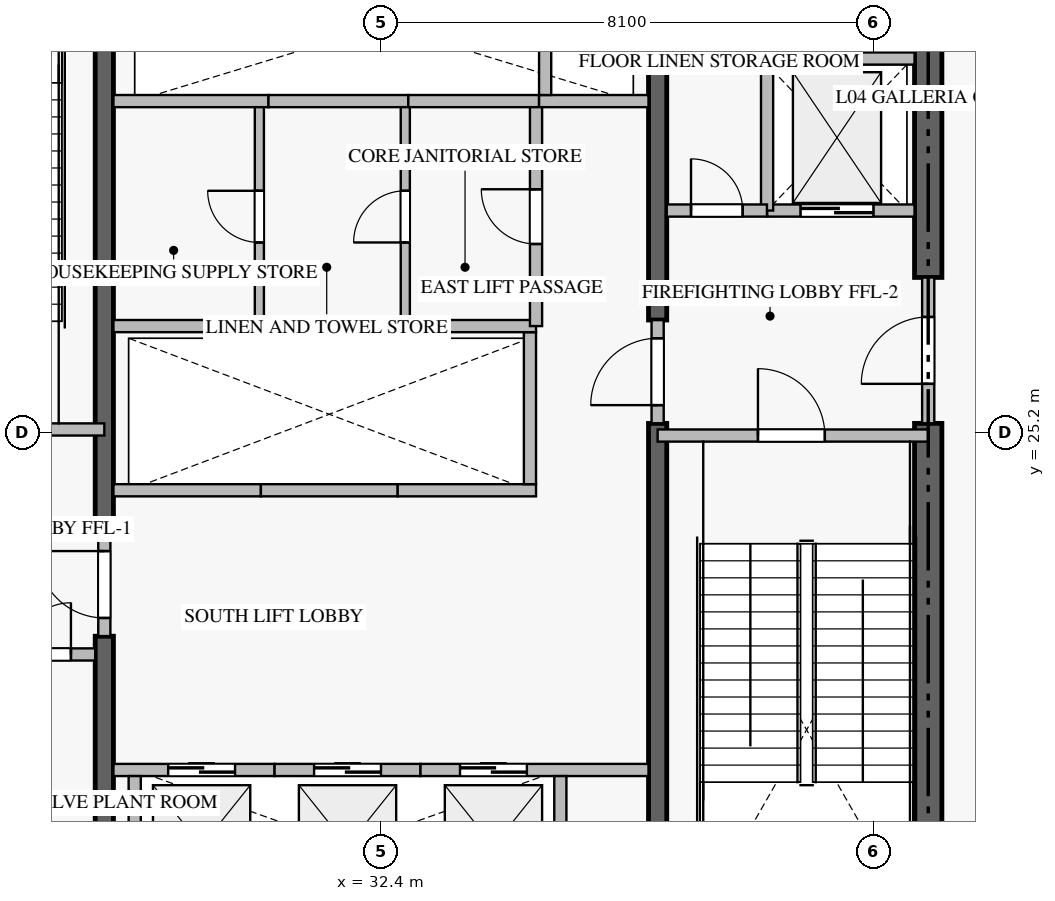
"""IFC4 building model, lengths in metres.
Left out: names, types, materials, properties, quantities, classifications, styles, units other than length and angle.
Written with IfcOpenShell. Run it as: python <this file> out.ifc"""

import sys

from ifc_helpers import new_model, si_unit, direction, frame, frame_2d, origin, place, context, subcontext, project, spatial, rectangle, extrude, source, transform, mapped, element, fill, save


model = new_model("IFC4")
c1 = context("Model", 3, precision=1e-05, world=origin(), true_north=direction((0.0, 1.0)))
c2 = subcontext(c1, "Body", "Model", "MODEL_VIEW")
j1 = project(units=[si_unit("LENGTHUNIT", "METRE"), si_unit("PLANEANGLEUNIT", "RADIAN")], contexts=[c1])
p1 = place(None, origin())
s1 = spatial("IfcSite", under=j1, at=p1, CompositionType="ELEMENT")
p2 = place(p1, origin())
s2 = spatial("IfcBuilding", under=s1, at=p2, CompositionType="ELEMENT")
p3 = place(p2, frame((0.0, 0.0, 21.0)))
s3 = spatial("IfcBuildingStorey", under=s2, at=p3, CompositionType="ELEMENT", Elevation=21.0)
p4 = place(p3, frame((41.4, 17.025, -0.85), z_axis=(0.0, 0.0, 1.0), x_axis=(0.0, 1.0, 0.0)))
e1 = element("IfcWall", 1, at=p4, inside=s3, PredefinedType="SHEAR", context=c2, shape_type="SweptSolid", body=[
    extrude(rectangle(XDim=8.325, YDim=0.45, at=frame_2d((4.163, 0.0))), origin(), (0.0, 0.0, 1.0), 6.108),
])
p5 = place(p3, frame((41.4, 27.75, -0.85), z_axis=(0.0, 0.0, 1.0), x_axis=(0.0, 1.0, 0.0)))
e2 = element("IfcWall", 2, at=p5, inside=s3, PredefinedType="SHEAR", context=c2, shape_type="SweptSolid", body=[
    extrude(rectangle(XDim=5.625, YDim=0.45, at=frame_2d((2.812, 0.0))), origin(), (0.0, 0.0, 1.0), 6.108),
])
p6 = place(p3, frame((27.85, 17.025, -0.85), z_axis=(0.0, 0.0, 1.0), x_axis=(0.0, 1.0, 0.0)))
e3 = element("IfcWall", 3, at=p6, inside=s3, PredefinedType="SHEAR", context=c2, shape_type="SweptSolid", body=[
    extrude(rectangle(XDim=4.825, YDim=0.3, at=frame_2d((2.413, 0.0))), origin(), (0.0, 0.0, 1.0), 6.108),
])
p7 = place(p3, frame((27.85, 23.55, -0.85), z_axis=(0.0, 0.0, 1.0), x_axis=(0.0, 1.0, 0.0)))
e4 = element("IfcWall", 4, at=p7, inside=s3, PredefinedType="SHEAR", context=c2, shape_type="SweptSolid", body=[
    extrude(rectangle(XDim=9.825, YDim=0.3, at=frame_2d((4.913, 0.0))), origin(), (0.0, 0.0, 1.0), 6.108),
])
p8 = place(p3, frame((36.95, 17.025, -0.85), z_axis=(0.0, 0.0, 1.0), x_axis=(0.0, 1.0, 0.0)))
e5 = element("IfcWall", 5, at=p8, inside=s3, PredefinedType="SHEAR", context=c2, shape_type="SweptSolid", body=[
    extrude(rectangle(XDim=8.325, YDim=0.3, at=frame_2d((4.163, 0.0))), origin(), (0.0, 0.0, 1.0), 6.108),
])
p9 = place(p3, frame((36.95, 27.05, -0.85), z_axis=(0.0, 0.0, 1.0), x_axis=(0.0, 1.0, 0.0)))
e6 = element("IfcWall", 6, at=p9, inside=s3, PredefinedType="SHEAR", context=c2, shape_type="SweptSolid", body=[
    extrude(rectangle(XDim=6.325, YDim=0.3, at=frame_2d((3.163, 0.0))), origin(), (0.0, 0.0, 1.0), 6.108),
])
p10 = place(p3, frame((23.4, 25.25, 0.0), z_axis=(0.0, 0.0, 1.0), x_axis=(1.0, 0.0, 0.0)))
e7 = element("IfcWall", 7, at=p10, inside=s3, PredefinedType="STANDARD", context=c2, shape_type="SweptSolid", body=[
    extrude(rectangle(XDim=4.45, YDim=0.2, at=frame_2d((2.225, 0.0))), origin(), (0.0, 0.0, 1.0), 5.26),
])
p11 = place(p10, frame((1.65, 0.0, 0.0)))
e8 = element("IfcOpeningElement", 8, at=p11, cuts=e7, PredefinedType="OPENING", context=c2, shape_type="SweptSolid", body=[
    extrude(rectangle(XDim=1.1, YDim=2.15, at=frame_2d((0.55, 1.075))), frame((0.0, 0.11, 0.0), z_axis=(0.0, -1.0, 0.0), x_axis=(1.0, 0.0, 0.0)), (0.0, 0.0, 1.0), 0.22),
])
p12 = place(p3, frame((36.95, 25.15, 0.0), z_axis=(0.0, 0.0, 1.0), x_axis=(1.0, 0.0, 0.0)))
e9 = element("IfcWall", 9, at=p12, inside=s3, PredefinedType="STANDARD", context=c2, shape_type="SweptSolid", body=[
    extrude(rectangle(XDim=4.45, YDim=0.2, at=frame_2d((2.225, 0.0))), origin(), (0.0, 0.0, 1.0), 5.26),
])
p13 = place(p12, frame((1.65, 0.0, 0.0)))
e10 = element("IfcOpeningElement", 10, at=p13, cuts=e9, PredefinedType="OPENING", context=c2, shape_type="SweptSolid", body=[
    extrude(rectangle(XDim=1.1, YDim=2.15, at=frame_2d((0.55, 1.075))), frame((0.0, 0.11, 0.0), z_axis=(0.0, -1.0, 0.0), x_axis=(1.0, 0.0, 0.0)), (0.0, 0.0, 1.0), 0.22),
])
p14 = place(p3, frame((38.75, 28.85, 0.0), z_axis=(0.0, 0.0, 1.0), x_axis=(1.0, 0.0, 0.0)))
e11 = element("IfcWall", 11, at=p14, inside=s3, PredefinedType="STANDARD", context=c2, shape_type="SweptSolid", body=[
    extrude(rectangle(XDim=2.425, YDim=0.2, at=frame_2d((1.212, 0.0))), origin(), (0.0, 0.0, 1.0), 5.26),
])
p15 = place(p14, frame((0.55, 0.0, 0.0)))
e12 = element("IfcOpeningElement", 12, at=p15, cuts=e11, PredefinedType="OPENING", context=c2, shape_type="SweptSolid", body=[
    extrude(rectangle(XDim=1.2, YDim=2.2, at=frame_2d((0.6, 1.1))), frame((0.0, 0.11, 0.0), z_axis=(0.0, -1.0, 0.0), x_axis=(1.0, 0.0, 0.0)), (0.0, 0.0, 1.0), 0.22),
])
p16 = place(p3, frame((28.0, 19.65, 0.0), z_axis=(0.0, 0.0, 1.0), x_axis=(1.0, 0.0, 0.0)))
e13 = element("IfcWall", 13, at=p16, inside=s3, PredefinedType="STANDARD", context=c2, shape_type="SweptSolid", body=[
    extrude(rectangle(XDim=2.65, YDim=0.2, at=frame_2d((1.325, 0.0))), origin(), (0.0, 0.0, 1.0), 5.26),
])
p17 = place(p16, frame((0.9, 0.0, 0.0)))
e14 = element("IfcOpeningElement", 14, at=p17, cuts=e13, PredefinedType="OPENING", context=c2, shape_type="SweptSolid", body=[
    extrude(rectangle(XDim=1.1, YDim=2.2, at=frame_2d((0.55, 1.1))), frame((0.0, 0.11, 0.0), z_axis=(0.0, -1.0, 0.0), x_axis=(1.0, 0.0, 0.0)), (0.0, 0.0, 1.0), 0.22),
])
p18 = place(p3, frame((28.35, 17.025, 0.0), z_axis=(0.0, 0.0, 1.0), x_axis=(0.0, 1.0, 0.0)))
e15 = element("IfcWall", 15, at=p18, inside=s3, PredefinedType="STANDARD", context=c2, shape_type="SweptSolid", body=[
    extrude(rectangle(XDim=2.525, YDim=0.2, at=frame_2d((1.263, 0.0))), origin(), (0.0, 0.0, 1.0), 5.26),
])
p19 = place(p3, frame((30.65, 19.65, 0.0), z_axis=(0.0, 0.0, 1.0), x_axis=(1.0, 0.0, 0.0)))
e16 = element("IfcWall", 16, at=p19, inside=s3, PredefinedType="STANDARD", context=c2, shape_type="SweptSolid", body=[
    extrude(rectangle(XDim=2.4, YDim=0.2, at=frame_2d((1.2, 0.0))), origin(), (0.0, 0.0, 1.0), 5.26),
])
p20 = place(p19, frame((0.65, 0.0, 0.0)))
e17 = element("IfcOpeningElement", 17, at=p20, cuts=e16, PredefinedType="OPENING", context=c2, shape_type="SweptSolid", body=[
    extrude(rectangle(XDim=1.1, YDim=2.2, at=frame_2d((0.55, 1.1))), frame((0.0, 0.11, 0.0), z_axis=(0.0, -1.0, 0.0), x_axis=(1.0, 0.0, 0.0)), (0.0, 0.0, 1.0), 0.22),
])
p21 = place(p3, frame((33.05, 19.65, 0.0), z_axis=(0.0, 0.0, 1.0), x_axis=(1.0, 0.0, 0.0)))
e18 = element("IfcWall", 18, at=p21, inside=s3, PredefinedType="STANDARD", context=c2, shape_type="SweptSolid", body=[
    extrude(rectangle(XDim=3.75, YDim=0.2, at=frame_2d((1.875, 0.0))), origin(), (0.0, 0.0, 1.0), 5.26),
])
p22 = place(p21, frame((0.65, 0.0, 0.0)))
e19 = element("IfcOpeningElement", 19, at=p22, cuts=e18, PredefinedType="OPENING", context=c2, shape_type="SweptSolid", body=[
    extrude(rectangle(XDim=1.1, YDim=2.2, at=frame_2d((0.55, 1.1))), frame((0.0, 0.11, 0.0), z_axis=(0.0, -1.0, 0.0), x_axis=(1.0, 0.0, 0.0)), (0.0, 0.0, 1.0), 0.22),
])
p23 = place(p3, frame((35.35, 17.025, 0.0), z_axis=(0.0, 0.0, 1.0), x_axis=(0.0, 1.0, 0.0)))
e20 = element("IfcWall", 20, at=p23, inside=s3, PredefinedType="STANDARD", context=c2, shape_type="SweptSolid", body=[
    extrude(rectangle(XDim=2.525, YDim=0.2, at=frame_2d((1.263, 0.0))), origin(), (0.0, 0.0, 1.0), 5.26),
])
p24 = place(p3, frame((28.0, 24.25, 0.0), z_axis=(0.0, 0.0, 1.0), x_axis=(1.0, 0.0, 0.0)))
e21 = element("IfcWall", 21, at=p24, inside=s3, PredefinedType="STANDARD", context=c2, shape_type="SweptSolid", body=[
    extrude(rectangle(XDim=2.425, YDim=0.2, at=frame_2d((1.212, 0.0))), origin(), (0.0, 0.0, 1.0), 5.26),
])
p25 = place(p3, frame((30.425, 24.25, 0.0), z_axis=(0.0, 0.0, 1.0), x_axis=(1.0, 0.0, 0.0)))
e22 = element("IfcWall", 22, at=p25, inside=s3, PredefinedType="STANDARD", context=c2, shape_type="SweptSolid", body=[
    extrude(rectangle(XDim=2.25, YDim=0.2, at=frame_2d((1.125, 0.0))), origin(), (0.0, 0.0, 1.0), 5.26),
])
p26 = place(p3, frame((32.675, 24.25, 0.0), z_axis=(0.0, 0.0, 1.0), x_axis=(1.0, 0.0, 0.0)))
e23 = element("IfcWall", 23, at=p26, inside=s3, PredefinedType="STANDARD", context=c2, shape_type="SweptSolid", body=[
    extrude(rectangle(XDim=2.275, YDim=0.2, at=frame_2d((1.137, 0.0))), origin(), (0.0, 0.0, 1.0), 5.26),
])
p27 = place(p3, frame((34.85, 24.35, 0.0), z_axis=(0.0, 0.0, 1.0), x_axis=(0.0, 1.0, 0.0)))
e24 = element("IfcWall", 24, at=p27, inside=s3, PredefinedType="STANDARD", context=c2, shape_type="SweptSolid", body=[
    extrude(rectangle(XDim=2.5, YDim=0.2, at=frame_2d((1.25, 0.0))), origin(), (0.0, 0.0, 1.0), 5.26),
])
p28 = place(p3, frame((28.0, 30.65, 0.0), z_axis=(0.0, 0.0, 1.0), x_axis=(1.0, 0.0, 0.0)))
e25 = element("IfcWall", 25, at=p28, inside=s3, PredefinedType="STANDARD", context=c2, shape_type="SweptSolid", body=[
    extrude(rectangle(XDim=2.55, YDim=0.2, at=frame_2d((1.275, 0.0))), origin(), (0.0, 0.0, 1.0), 5.26),
])
p29 = place(p3, frame((30.55, 30.65, 0.0), z_axis=(0.0, 0.0, 1.0), x_axis=(1.0, 0.0, 0.0)))
e26 = element("IfcWall", 26, at=p29, inside=s3, PredefinedType="STANDARD", context=c2, shape_type="SweptSolid", body=[
    extrude(rectangle(XDim=2.3, YDim=0.2, at=frame_2d((1.15, 0.0))), origin(), (0.0, 0.0, 1.0), 5.26),
])
p30 = place(p3, frame((32.85, 30.65, 0.0), z_axis=(0.0, 0.0, 1.0), x_axis=(1.0, 0.0, 0.0)))
e27 = element("IfcWall", 27, at=p30, inside=s3, PredefinedType="STANDARD", context=c2, shape_type="SweptSolid", body=[
    extrude(rectangle(XDim=2.15, YDim=0.2, at=frame_2d((1.075, 0.0))), origin(), (0.0, 0.0, 1.0), 5.26),
])
p31 = place(p3, frame((35.0, 30.65, 0.0), z_axis=(0.0, 0.0, 1.0), x_axis=(1.0, 0.0, 0.0)))
e28 = element("IfcWall", 28, at=p31, inside=s3, PredefinedType="STANDARD", context=c2, shape_type="SweptSolid", body=[
    extrude(rectangle(XDim=1.8, YDim=0.2, at=frame_2d((0.9, 0.0))), origin(), (0.0, 0.0, 1.0), 5.26),
])
p32 = place(p3, frame((35.1, 30.75, 0.0), z_axis=(0.0, 0.0, 1.0), x_axis=(0.0, 1.0, 0.0)))
e29 = element("IfcWall", 29, at=p32, inside=s3, PredefinedType="STANDARD", context=c2, shape_type="SweptSolid", body=[
    extrude(rectangle(XDim=2.625, YDim=0.2, at=frame_2d((1.312, 0.0))), origin(), (0.0, 0.0, 1.0), 5.26),
])
p33 = place(p3, frame((26.052, 21.55, 0.0), z_axis=(0.0, 0.0, 1.0), x_axis=(1.0, 0.0, 0.0)))
e30 = element("IfcWall", 30, at=p33, inside=s3, PredefinedType="STANDARD", context=c2, shape_type="SweptSolid", body=[
    extrude(rectangle(XDim=1.648, YDim=0.2, at=frame_2d((0.824, 0.0))), origin(), (0.0, 0.0, 1.0), 5.26),
])
p34 = place(p33, frame((0.399, 0.0, 0.0)))
e31 = element("IfcOpeningElement", 31, at=p34, cuts=e30, PredefinedType="OPENING", context=c2, shape_type="SweptSolid", body=[
    extrude(rectangle(XDim=0.85, YDim=2.1, at=frame_2d((0.425, 1.05))), frame((0.0, 0.11, 0.0), z_axis=(0.0, -1.0, 0.0), x_axis=(1.0, 0.0, 0.0)), (0.0, 0.0, 1.0), 0.22),
])
p35 = place(p3, frame((38.75, 28.85, 0.0), z_axis=(0.0, 0.0, 1.0), x_axis=(0.0, 1.0, 0.0)))
e32 = element("IfcWall", 32, at=p35, inside=s3, PredefinedType="STANDARD", context=c2, shape_type="SweptSolid", body=[
    extrude(rectangle(XDim=2.5, YDim=0.2, at=frame_2d((1.25, 0.0))), origin(), (0.0, 0.0, 1.0), 5.26),
])
p36 = place(p3, frame((38.75, 31.35, 0.0), z_axis=(0.0, 0.0, 1.0), x_axis=(1.0, 0.0, 0.0)))
e33 = element("IfcWall", 33, at=p36, inside=s3, PredefinedType="STANDARD", context=c2, shape_type="SweptSolid", body=[
    extrude(rectangle(XDim=2.425, YDim=0.2, at=frame_2d((1.212, 0.0))), origin(), (0.0, 0.0, 1.0), 5.26),
])
p37 = place(p3, frame((37.1, 28.85, 0.0), z_axis=(0.0, 0.0, 1.0), x_axis=(1.0, 0.0, 0.0)))
e34 = element("IfcWall", 34, at=p37, inside=s3, PredefinedType="STANDARD", context=c2, shape_type="SweptSolid", body=[
    extrude(rectangle(XDim=1.648, YDim=0.2, at=frame_2d((0.824, 0.0))), origin(), (0.0, 0.0, 1.0), 5.26),
])
p38 = place(p37, frame((0.399, 0.0, 0.0)))
e35 = element("IfcOpeningElement", 35, at=p38, cuts=e34, PredefinedType="OPENING", context=c2, shape_type="SweptSolid", body=[
    extrude(rectangle(XDim=0.85, YDim=2.1, at=frame_2d((0.425, 1.05))), frame((0.0, 0.11, 0.0), z_axis=(0.0, -1.0, 0.0), x_axis=(1.0, 0.0, 0.0)), (0.0, 0.0, 1.0), 0.22),
])
p39 = place(p3, frame((41.4, 25.352, 0.0), z_axis=(0.0, 0.0, 1.0), x_axis=(0.0, 1.0, 0.0)))
e36 = element("IfcWall", 36, at=p39, inside=s3, PredefinedType="STANDARD", context=c2, shape_type="SweptSolid", body=[
    extrude(rectangle(XDim=2.396, YDim=0.2, at=frame_2d((1.198, 0.0))), origin(), (0.0, 0.0, 1.0), 5.26),
])
p40 = place(p39, frame((0.648, 0.0, 0.0)))
e37 = element("IfcOpeningElement", 37, at=p40, cuts=e36, PredefinedType="OPENING", context=c2, shape_type="SweptSolid", body=[
    extrude(rectangle(XDim=1.1, YDim=2.15, at=frame_2d((0.55, 1.075))), frame((0.0, 0.11, 0.0), z_axis=(0.0, -1.0, 0.0), x_axis=(1.0, 0.0, 0.0)), (0.0, 0.0, 1.0), 0.22),
])
p41 = place(p3, frame((27.85, 21.852, 0.0), z_axis=(0.0, 0.0, 1.0), x_axis=(0.0, 1.0, 0.0)))
e38 = element("IfcWall", 38, at=p41, inside=s3, PredefinedType="STANDARD", context=c2, shape_type="SweptSolid", body=[
    extrude(rectangle(XDim=1.696, YDim=0.2, at=frame_2d((0.848, 0.0))), origin(), (0.0, 0.0, 1.0), 5.26),
])
p42 = place(p41, frame((0.298, 0.0, 0.0)))
e39 = element("IfcOpeningElement", 39, at=p42, cuts=e38, PredefinedType="OPENING", context=c2, shape_type="SweptSolid", body=[
    extrude(rectangle(XDim=1.1, YDim=2.15, at=frame_2d((0.55, 1.075))), frame((0.0, 0.11, 0.0), z_axis=(0.0, -1.0, 0.0), x_axis=(1.0, 0.0, 0.0)), (0.0, 0.0, 1.0), 0.22),
])
p43 = place(p3, frame((36.95, 25.352, 0.0), z_axis=(0.0, 0.0, 1.0), x_axis=(0.0, 1.0, 0.0)))
e40 = element("IfcWall", 40, at=p43, inside=s3, PredefinedType="STANDARD", context=c2, shape_type="SweptSolid", body=[
    extrude(rectangle(XDim=1.696, YDim=0.2, at=frame_2d((0.848, 0.0))), origin(), (0.0, 0.0, 1.0), 5.26),
])
p44 = place(p43, frame((0.298, 0.0, 0.0)))
e41 = element("IfcOpeningElement", 41, at=p44, cuts=e40, PredefinedType="OPENING", context=c2, shape_type="SweptSolid", body=[
    extrude(rectangle(XDim=1.1, YDim=2.15, at=frame_2d((0.55, 1.075))), frame((0.0, 0.11, 0.0), z_axis=(0.0, -1.0, 0.0), x_axis=(1.0, 0.0, 0.0)), (0.0, 0.0, 1.0), 0.22),
])
p45 = place(p3, frame((28.0, 26.95, 0.0), z_axis=(0.0, 0.0, 1.0), x_axis=(1.0, 0.0, 0.0)))
e42 = element("IfcWall", 42, at=p45, inside=s3, PredefinedType="STANDARD", context=c2, shape_type="SweptSolid", body=[
    extrude(rectangle(XDim=6.95, YDim=0.2, at=frame_2d((3.475, 0.0))), origin(), (0.0, 0.0, 1.0), 5.26),
])
p46 = place(p3, frame((39.4, 31.35, 0.0), z_axis=(0.0, 0.0, 1.0), x_axis=(0.0, 1.0, 0.0)))
e43 = element("IfcWall", 43, at=p46, inside=s3, PredefinedType="PARTITIONING", context=c2, shape_type="SweptSolid", body=[
    extrude(rectangle(XDim=2.025, YDim=0.15, at=frame_2d((1.012, 0.0))), origin(), (0.0, 0.0, 1.0), 5.26),
])
p47 = place(p46, frame((0.587, 0.0, 0.0)))
e44 = element("IfcOpeningElement", 44, at=p47, cuts=e43, PredefinedType="OPENING", context=c2, shape_type="SweptSolid", body=[
    extrude(rectangle(XDim=0.85, YDim=2.1, at=frame_2d((0.425, 1.05))), frame((0.0, 0.085, 0.0), z_axis=(0.0, -1.0, 0.0), x_axis=(1.0, 0.0, 0.0)), (0.0, 0.0, 1.0), 0.17),
])
p48 = place(p3, frame((34.95, 26.95, 0.0), z_axis=(0.0, 0.0, 1.0), x_axis=(0.0, 1.0, 0.0)))
e45 = element("IfcWall", 45, at=p48, inside=s3, PredefinedType="STANDARD", context=c2, shape_type="SweptSolid", body=[
    extrude(rectangle(XDim=3.6, YDim=0.2, at=frame_2d((1.8, 0.0))), origin(), (0.0, 0.0, 1.0), 5.26),
])
p49 = place(p48, frame((1.35, 0.0, 0.0)))
e46 = element("IfcOpeningElement", 46, at=p49, cuts=e45, PredefinedType="OPENING", context=c2, shape_type="SweptSolid", body=[
    extrude(rectangle(XDim=0.9, YDim=2.1, at=frame_2d((0.45, 1.05))), frame((0.0, 0.11, 0.0), z_axis=(0.0, -1.0, 0.0), x_axis=(1.0, 0.0, 0.0)), (0.0, 0.0, 1.0), 0.22),
])
p50 = place(p3, frame((32.8, 26.95, 0.0), z_axis=(0.0, 0.0, 1.0), x_axis=(0.0, 1.0, 0.0)))
e47 = element("IfcWall", 47, at=p50, inside=s3, PredefinedType="PARTITIONING", context=c2, shape_type="SweptSolid", body=[
    extrude(rectangle(XDim=3.6, YDim=0.15, at=frame_2d((1.8, 0.0))), origin(), (0.0, 0.0, 1.0), 5.26),
])
p51 = place(p50, frame((1.375, 0.0, 0.0)))
e48 = element("IfcOpeningElement", 48, at=p51, cuts=e47, PredefinedType="OPENING", context=c2, shape_type="SweptSolid", body=[
    extrude(rectangle(XDim=0.85, YDim=2.1, at=frame_2d((0.425, 1.05))), frame((0.0, 0.085, 0.0), z_axis=(0.0, -1.0, 0.0), x_axis=(1.0, 0.0, 0.0)), (0.0, 0.0, 1.0), 0.17),
])
p52 = place(p3, frame((30.4, 26.95, 0.0), z_axis=(0.0, 0.0, 1.0), x_axis=(0.0, 1.0, 0.0)))
e49 = element("IfcWall", 49, at=p52, inside=s3, PredefinedType="PARTITIONING", context=c2, shape_type="SweptSolid", body=[
    extrude(rectangle(XDim=3.6, YDim=0.15, at=frame_2d((1.8, 0.0))), origin(), (0.0, 0.0, 1.0), 5.26),
])
p53 = place(p52, frame((1.375, 0.0, 0.0)))
e50 = element("IfcOpeningElement", 50, at=p53, cuts=e49, PredefinedType="OPENING", context=c2, shape_type="SweptSolid", body=[
    extrude(rectangle(XDim=0.85, YDim=2.1, at=frame_2d((0.425, 1.05))), frame((0.0, 0.085, 0.0), z_axis=(0.0, -1.0, 0.0), x_axis=(1.0, 0.0, 0.0)), (0.0, 0.0, 1.0), 0.17),
])
m1 = source(origin(), c2, "Body", "SweptSolid", [
    extrude(rectangle(XDim=1.1, YDim=2.15, at=frame_2d((0.55, 1.075))), frame((0.0, 0.025, 0.0), z_axis=(0.0, -1.0, 0.0), x_axis=(1.0, 0.0, 0.0)), (0.0, 0.0, 1.0), 0.05),
])
p54 = place(p13, origin())
e51 = element("IfcDoor", 51, at=p54, inside=s3, OperationType="SINGLE_SWING_LEFT", PredefinedType="DOOR", context=c2, shape_type="MappedRepresentation", body=[
    mapped(m1, transform((0.0, 0.0, 0.0), scale=1.0)),
])
fill(e10, e51)
m2 = source(origin(), c2, "Body", "SweptSolid", [
    extrude(rectangle(XDim=1.2, YDim=2.2, at=frame_2d((0.6, 1.1))), frame((0.0, 0.025, 0.0), z_axis=(0.0, -1.0, 0.0), x_axis=(1.0, 0.0, 0.0)), (0.0, 0.0, 1.0), 0.05),
])
p55 = place(p15, origin())
e52 = element("IfcDoor", 52, at=p55, inside=s3, OperationType="DOUBLE_DOOR_SLIDING", PredefinedType="DOOR", context=c2, shape_type="MappedRepresentation", body=[
    mapped(m2, transform((0.0, 0.0, 0.0), scale=1.0)),
])
fill(e12, e52)
m3 = source(origin(), c2, "Body", "SweptSolid", [
    extrude(rectangle(XDim=1.1, YDim=2.2, at=frame_2d((0.55, 1.1))), frame((0.0, 0.025, 0.0), z_axis=(0.0, -1.0, 0.0), x_axis=(1.0, 0.0, 0.0)), (0.0, 0.0, 1.0), 0.05),
])
p56 = place(p17, origin())
e53 = element("IfcDoor", 53, at=p56, inside=s3, OperationType="DOUBLE_DOOR_SLIDING", PredefinedType="DOOR", context=c2, shape_type="MappedRepresentation", body=[
    mapped(m3, transform((0.0, 0.0, 0.0), scale=1.0)),
])
fill(e14, e53)
p57 = place(p20, origin())
e54 = element("IfcDoor", 54, at=p57, inside=s3, OperationType="DOUBLE_DOOR_SLIDING", PredefinedType="DOOR", context=c2, shape_type="MappedRepresentation", body=[
    mapped(m3, transform((0.0, 0.0, 0.0), scale=1.0)),
])
fill(e17, e54)
p58 = place(p22, origin())
e55 = element("IfcDoor", 55, at=p58, inside=s3, OperationType="DOUBLE_DOOR_SLIDING", PredefinedType="DOOR", context=c2, shape_type="MappedRepresentation", body=[
    mapped(m3, transform((0.0, 0.0, 0.0), scale=1.0)),
])
fill(e19, e55)
m4 = source(origin(), c2, "Body", "SweptSolid", [
    extrude(rectangle(XDim=0.85, YDim=2.1, at=frame_2d((0.425, 1.05))), frame((0.0, 0.025, 0.0), z_axis=(0.0, -1.0, 0.0), x_axis=(1.0, 0.0, 0.0)), (0.0, 0.0, 1.0), 0.05),
])
p59 = place(p34, origin())
e56 = element("IfcDoor", 56, at=p59, inside=s3, OperationType="SINGLE_SWING_RIGHT", PredefinedType="DOOR", context=c2, shape_type="MappedRepresentation", body=[
    mapped(m4, transform((0.0, 0.0, 0.0), scale=1.0)),
])
fill(e31, e56)
p60 = place(p38, origin())
e57 = element("IfcDoor", 57, at=p60, inside=s3, OperationType="SINGLE_SWING_LEFT", PredefinedType="DOOR", context=c2, shape_type="MappedRepresentation", body=[
    mapped(m4, transform((0.0, 0.0, 0.0), scale=1.0)),
])
fill(e35, e57)
p61 = place(p40, origin())
e58 = element("IfcDoor", 58, at=p61, inside=s3, OperationType="SINGLE_SWING_LEFT", PredefinedType="DOOR", context=c2, shape_type="MappedRepresentation", body=[
    mapped(m1, transform((0.0, 0.0, 0.0), scale=1.0)),
])
fill(e37, e58)
p62 = place(p42, origin())
e59 = element("IfcDoor", 59, at=p62, inside=s3, OperationType="SINGLE_SWING_RIGHT", PredefinedType="DOOR", context=c2, shape_type="MappedRepresentation", body=[
    mapped(m1, transform((0.0, 0.0, 0.0), scale=1.0)),
])
fill(e39, e59)
p63 = place(p44, origin())
e60 = element("IfcDoor", 60, at=p63, inside=s3, OperationType="SINGLE_SWING_LEFT", PredefinedType="DOOR", context=c2, shape_type="MappedRepresentation", body=[
    mapped(m1, transform((0.0, 0.0, 0.0), scale=1.0)),
])
fill(e41, e60)
m5 = source(origin(), c2, "Body", "SweptSolid", [
    extrude(rectangle(XDim=0.9, YDim=2.1, at=frame_2d((0.45, 1.05))), frame((0.0, 0.025, 0.0), z_axis=(0.0, -1.0, 0.0), x_axis=(1.0, 0.0, 0.0)), (0.0, 0.0, 1.0), 0.05),
])
p64 = place(p49, origin())
e61 = element("IfcDoor", 61, at=p64, inside=s3, OperationType="SINGLE_SWING_RIGHT", PredefinedType="DOOR", context=c2, shape_type="MappedRepresentation", body=[
    mapped(m5, transform((0.0, 0.0, 0.0), scale=1.0)),
])
fill(e46, e61)
p65 = place(p51, origin())
e62 = element("IfcDoor", 62, at=p65, inside=s3, OperationType="SINGLE_SWING_LEFT", PredefinedType="DOOR", context=c2, shape_type="MappedRepresentation", body=[
    mapped(m4, transform((0.0, 0.0, 0.0), scale=1.0)),
])
fill(e48, e62)
p66 = place(p53, origin())
e63 = element("IfcDoor", 63, at=p66, inside=s3, OperationType="SINGLE_SWING_RIGHT", PredefinedType="DOOR", context=c2, shape_type="MappedRepresentation", body=[
    mapped(m4, transform((0.0, 0.0, 0.0), scale=1.0)),
])
fill(e50, e63)
save(model, sys.argv[1])
